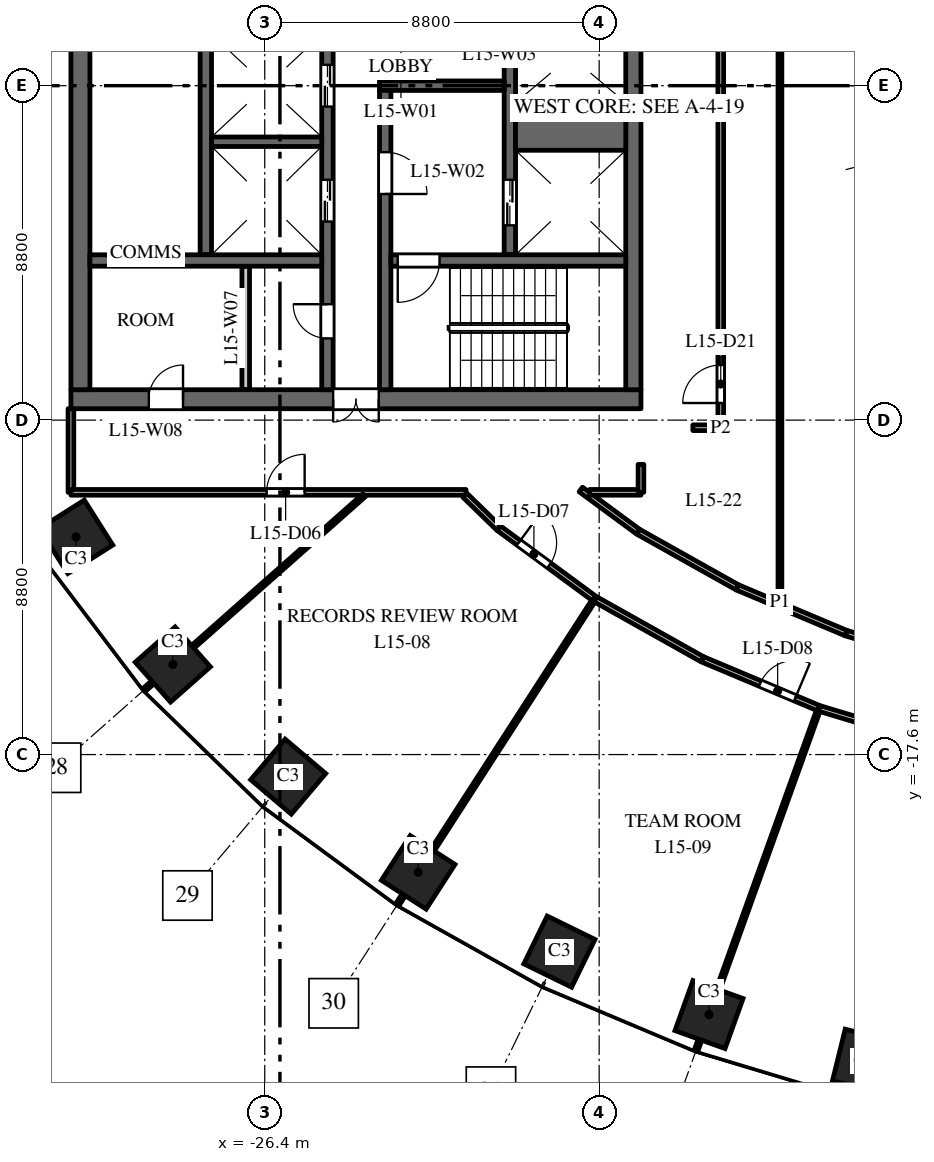
"""IFC4 building model, lengths in metres.
Left out: names, types, materials, properties, quantities, classifications, styles, units other than length and angle.
Written with IfcOpenShell. Run it as: python <this file> out.ifc"""

import sys

from ifc_helpers import new_model, si_unit, direction, frame, frame_2d, origin, origin_2d, place, context, subcontext, project, spatial, rectangle, extrude, element, fill, save


model = new_model("IFC4")
c1 = context("Model", 3, precision=1e-05, world=origin(), true_north=direction((0.0, 1.0)))
c2 = subcontext(c1, "Body", "Model", "MODEL_VIEW")
j1 = project(units=[si_unit("LENGTHUNIT", "METRE"), si_unit("PLANEANGLEUNIT", "RADIAN")], contexts=[c1])
p1 = place(None, origin())
s1 = spatial("IfcSite", under=j1, at=p1, CompositionType="ELEMENT")
p2 = place(p1, origin())
s2 = spatial("IfcBuilding", under=s1, at=p2, CompositionType="ELEMENT")
p3 = place(p2, frame((0.0, 0.0, 70.5)))
s3 = spatial("IfcBuildingStorey", under=s2, at=p3, CompositionType="ELEMENT", Elevation=70.5)
for number, where, z_axis, x_axis in (
    (1, (-31.365, -11.871, 0.0), (0.0, 0.0, 1.0), (0.535, -0.845, 0.0)),
    (2, (-28.819, -15.23, 0.0), (0.0, 0.0, 1.0), (0.663, -0.749, 0.0)),
    (3, (-25.783, -18.18, 0.0), (0.0, 0.0, 1.0), (0.763, -0.646, 0.0)),
    (4, (-22.362, -20.7, 0.0), (0.0, 0.0, 1.0), (0.84, -0.542, 0.0)),
    (5, (-18.646, -22.785, 0.0), (0.0, 0.0, 1.0), (0.898, -0.439, 0.0)),
    (6, (-14.709, -24.441, 0.0), (0.0, 0.0, 1.0), (0.941, -0.338, 0.0)),
    (7, (-10.613, -25.674, 0.0), (0.0, 0.0, 1.0), (0.971, -0.24, 0.0)),
):
    element("IfcColumn", number, at=place(p3, frame(where, z_axis=z_axis, x_axis=x_axis)), inside=s3, PredefinedType="COLUMN", context=c2, shape_type="SweptSolid", body=[
        extrude(rectangle(XDim=1.4, YDim=1.4, at=origin_2d()), origin(), (0.0, 0.0, 1.0), 4.0),
    ])
p4 = place(p3, frame((-16.5, -8.25, 0.0), z_axis=(0.0, 0.0, 1.0), x_axis=(-1.0, 0.0, 0.0)))
e8 = element("IfcWall", 8, at=p4, inside=s3, PredefinedType="SHEAR", context=c2, shape_type="SweptSolid", body=[
    extrude(rectangle(XDim=15.0, YDim=0.5, at=frame_2d((7.5, 0.0))), origin(), (0.0, 0.0, 1.0), 3.7),
])
p5 = place(p4, frame((6.9, 0.0, 0.0)))
e9 = element("IfcOpeningElement", 9, at=p5, cuts=e8, PredefinedType="OPENING", context=c2, shape_type="SweptSolid", body=[
    extrude(rectangle(XDim=1.2, YDim=2.1, at=frame_2d((0.6, 1.05))), frame((0.0, 0.26, 0.0), z_axis=(0.0, -1.0, 0.0), x_axis=(1.0, 0.0, 0.0)), (0.0, 0.0, 1.0), 0.52),
])
p6 = place(p4, frame((12.05, 0.0, 0.0)))
e10 = element("IfcOpeningElement", 10, at=p6, cuts=e8, PredefinedType="OPENING", context=c2, shape_type="SweptSolid", body=[
    extrude(rectangle(XDim=0.9, YDim=2.1, at=frame_2d((0.45, 1.05))), frame((0.0, 0.26, 0.0), z_axis=(0.0, -1.0, 0.0), x_axis=(1.0, 0.0, 0.0)), (0.0, 0.0, 1.0), 0.52),
])
p7 = place(p3, frame((-27.95, -4.45, 0.0), z_axis=(0.0, 0.0, 1.0), x_axis=(0.0, 1.0, 0.0)))
e11 = element("IfcWall", 11, at=p7, inside=s3, PredefinedType="SHEAR", context=c2, shape_type="SweptSolid", body=[
    extrude(rectangle(XDim=8.9, YDim=0.3, at=frame_2d((4.45, 0.0))), origin(), (0.0, 0.0, 1.0), 3.7),
])
p8 = place(p3, frame((-19.95, -4.45, 0.0), z_axis=(0.0, 0.0, 1.0), x_axis=(0.0, 1.0, 0.0)))
e12 = element("IfcWall", 12, at=p8, inside=s3, PredefinedType="SHEAR", context=c2, shape_type="SweptSolid", body=[
    extrude(rectangle(XDim=8.9, YDim=0.3, at=frame_2d((4.45, 0.0))), origin(), (0.0, 0.0, 1.0), 3.7),
])
p9 = place(p8, frame((0.775, 0.0, 0.0)))
e13 = element("IfcOpeningElement", 13, at=p9, cuts=e12, PredefinedType="OPENING", context=c2, shape_type="SweptSolid", body=[
    extrude(rectangle(XDim=1.2, YDim=2.1, at=frame_2d((0.6, 1.05))), frame((0.0, 0.16, 0.0), z_axis=(0.0, -1.0, 0.0), x_axis=(1.0, 0.0, 0.0)), (0.0, 0.0, 1.0), 0.32),
])
p10 = place(p8, frame((7.35, 0.0, 0.0)))
e14 = element("IfcOpeningElement", 14, at=p10, cuts=e12, PredefinedType="OPENING", context=c2, shape_type="SweptSolid", body=[
    extrude(rectangle(XDim=0.9, YDim=2.1, at=frame_2d((0.45, 1.05))), frame((0.0, 0.16, 0.0), z_axis=(0.0, -1.0, 0.0), x_axis=(1.0, 0.0, 0.0)), (0.0, 0.0, 1.0), 0.32),
])
p11 = place(p3, frame((-24.75, -8.0, 0.0), z_axis=(0.0, 0.0, 1.0), x_axis=(0.0, 1.0, 0.0)))
e15 = element("IfcWall", 15, at=p11, inside=s3, PredefinedType="SHEAR", context=c2, shape_type="SweptSolid", body=[
    extrude(rectangle(XDim=16.0, YDim=0.3, at=frame_2d((8.0, 0.0))), origin(), (0.0, 0.0, 1.0), 3.7),
])
p12 = place(p11, frame((4.425, 0.0, 0.0)))
e16 = element("IfcOpeningElement", 16, at=p12, cuts=e15, PredefinedType="OPENING", context=c2, shape_type="SweptSolid", body=[
    extrude(rectangle(XDim=1.1, YDim=2.1, at=frame_2d((0.55, 1.05))), frame((0.0, 0.16, 0.0), z_axis=(0.0, -1.0, 0.0), x_axis=(1.0, 0.0, 0.0)), (0.0, 0.0, 1.0), 0.32),
])
p13 = place(p11, frame((7.45, 0.0, 0.0)))
e17 = element("IfcOpeningElement", 17, at=p13, cuts=e15, PredefinedType="OPENING", context=c2, shape_type="SweptSolid", body=[
    extrude(rectangle(XDim=1.1, YDim=2.1, at=frame_2d((0.55, 1.05))), frame((0.0, 0.16, 0.0), z_axis=(0.0, -1.0, 0.0), x_axis=(1.0, 0.0, 0.0)), (0.0, 0.0, 1.0), 0.32),
])
p14 = place(p11, frame((10.425, 0.0, 0.0)))
e18 = element("IfcOpeningElement", 18, at=p14, cuts=e15, PredefinedType="OPENING", context=c2, shape_type="SweptSolid", body=[
    extrude(rectangle(XDim=1.2, YDim=2.1, at=frame_2d((0.6, 1.05))), frame((0.0, 0.16, 0.0), z_axis=(0.0, -1.0, 0.0), x_axis=(1.0, 0.0, 0.0)), (0.0, 0.0, 1.0), 0.32),
])
p15 = place(p11, frame((13.75, 0.0, 0.0)))
e19 = element("IfcOpeningElement", 19, at=p15, cuts=e15, PredefinedType="OPENING", context=c2, shape_type="SweptSolid", body=[
    extrude(rectangle(XDim=0.9, YDim=2.1, at=frame_2d((0.45, 1.05))), frame((0.0, 0.16, 0.0), z_axis=(0.0, -1.0, 0.0), x_axis=(1.0, 0.0, 0.0)), (0.0, 0.0, 1.0), 0.32),
])
p16 = place(p11, frame((1.35, 0.0, 0.0)))
e20 = element("IfcOpeningElement", 20, at=p16, cuts=e15, PredefinedType="OPENING", context=c2, shape_type="SweptSolid", body=[
    extrude(rectangle(XDim=0.9, YDim=2.1, at=frame_2d((0.45, 1.05))), frame((0.0, 0.16, 0.0), z_axis=(0.0, -1.0, 0.0), x_axis=(1.0, 0.0, 0.0)), (0.0, 0.0, 1.0), 0.32),
])
p17 = place(p3, frame((-20.1, 0.0, 0.0), z_axis=(0.0, 0.0, 1.0), x_axis=(-1.0, 0.0, 0.0)))
e21 = element("IfcWall", 21, at=p17, inside=s3, PredefinedType="SHEAR", context=c2, shape_type="SweptSolid", body=[
    extrude(rectangle(XDim=3.28, YDim=0.25, at=frame_2d((1.64, 0.0))), origin(), (0.0, 0.0, 1.0), 3.7),
])
p18 = place(p3, frame((-16.7, -8.0, 0.0), z_axis=(0.0, 0.0, 1.0), x_axis=(0.0, 1.0, 0.0)))
e22 = element("IfcWall", 22, at=p18, inside=s3, PredefinedType="SHEAR", context=c2, shape_type="SweptSolid", body=[
    extrude(rectangle(XDim=16.0, YDim=0.4, at=frame_2d((8.0, 0.0))), origin(), (0.0, 0.0, 1.0), 3.7),
])
p19 = place(p3, frame((-31.25, -8.0, 0.0), z_axis=(0.0, 0.0, 1.0), x_axis=(0.0, 1.0, 0.0)))
e23 = element("IfcWall", 23, at=p19, inside=s3, PredefinedType="SHEAR", context=c2, shape_type="SweptSolid", body=[
    extrude(rectangle(XDim=16.0, YDim=0.5, at=frame_2d((8.0, 0.0))), origin(), (0.0, 0.0, 1.0), 3.7),
])
p20 = place(p3, frame((-26.9, -8.0, 0.0), z_axis=(0.0, 0.0, 1.0), x_axis=(0.0, 1.0, 0.0)))
e24 = element("IfcWall", 24, at=p20, inside=s3, PredefinedType="PARTITIONING", context=c2, shape_type="SweptSolid", body=[
    extrude(rectangle(XDim=3.25, YDim=0.2, at=frame_2d((1.625, 0.0))), origin(), (0.0, 0.0, 1.0), 3.7),
])
p21 = place(p3, frame((-24.9, -4.6, 0.0), z_axis=(0.0, 0.0, 1.0), x_axis=(-1.0, 0.0, 0.0)))
e25 = element("IfcWall", 25, at=p21, inside=s3, PredefinedType="SHEAR", context=c2, shape_type="SweptSolid", body=[
    extrude(rectangle(XDim=6.1, YDim=0.3, at=frame_2d((3.05, 0.0))), origin(), (0.0, 0.0, 1.0), 3.7),
])
p22 = place(p3, frame((-16.9, -1.075, 0.0), z_axis=(0.0, 0.0, 1.0), x_axis=(-1.0, 0.0, 0.0)))
e26 = element("IfcWall", 26, at=p22, inside=s3, PredefinedType="SHEAR", context=c2, shape_type="SweptSolid", body=[
    extrude(rectangle(XDim=2.9, YDim=1.25, at=frame_2d((1.45, 0.0))), origin(), (0.0, 0.0, 1.0), 3.7),
])
p23 = place(p3, frame((-24.9, -1.475, 0.0), z_axis=(0.0, 0.0, 1.0), x_axis=(-1.0, 0.0, 0.0)))
e27 = element("IfcWall", 27, at=p23, inside=s3, PredefinedType="SHEAR", context=c2, shape_type="SweptSolid", body=[
    extrude(rectangle(XDim=2.9, YDim=0.25, at=frame_2d((1.45, 0.0))), origin(), (0.0, 0.0, 1.0), 3.7),
])
p24 = place(p3, frame((-23.23, -8.0, 0.0), z_axis=(0.0, 0.0, 1.0), x_axis=(0.0, 1.0, 0.0)))
e28 = element("IfcWall", 28, at=p24, inside=s3, PredefinedType="SHEAR", context=c2, shape_type="SweptSolid", body=[
    extrude(rectangle(XDim=7.875, YDim=0.3, at=frame_2d((3.938, 0.0))), origin(), (0.0, 0.0, 1.0), 3.7),
])
p25 = place(p24, frame((5.15, 0.0, 0.0)))
e29 = element("IfcOpeningElement", 29, at=p25, cuts=e28, PredefinedType="OPENING", context=c2, shape_type="SweptSolid", body=[
    extrude(rectangle(XDim=1.1, YDim=2.1, at=frame_2d((0.55, 1.05))), frame((0.0, 0.16, 0.0), z_axis=(0.0, -1.0, 0.0), x_axis=(1.0, 0.0, 0.0)), (0.0, 0.0, 1.0), 0.32),
])
p26 = place(p3, frame((-16.9, -4.6, 0.0), z_axis=(0.0, 0.0, 1.0), x_axis=(-1.0, 0.0, 0.0)))
e30 = element("IfcWall", 30, at=p26, inside=s3, PredefinedType="SHEAR", context=c2, shape_type="SweptSolid", body=[
    extrude(rectangle(XDim=6.18, YDim=0.3, at=frame_2d((3.09, 0.0))), origin(), (0.0, 0.0, 1.0), 3.7),
])
p27 = place(p26, frame((4.9, 0.0, 0.0)))
e31 = element("IfcOpeningElement", 31, at=p27, cuts=e30, PredefinedType="OPENING", context=c2, shape_type="SweptSolid", body=[
    extrude(rectangle(XDim=1.1, YDim=2.1, at=frame_2d((0.55, 1.05))), frame((0.0, 0.16, 0.0), z_axis=(0.0, -1.0, 0.0), x_axis=(1.0, 0.0, 0.0)), (0.0, 0.0, 1.0), 0.32),
])
p28 = place(p3, frame((-31.5, -10.7, 0.0), z_axis=(0.0, 0.0, 1.0), x_axis=(0.0, 1.0, 0.0)))
e32 = element("IfcWall", 32, at=p28, inside=s3, PredefinedType="PARTITIONING", context=c2, shape_type="SweptSolid", body=[
    extrude(rectangle(XDim=2.2, YDim=0.15, at=frame_2d((1.1, 0.0))), origin(), (0.0, 0.0, 1.0), 3.7),
])
p29 = place(p3, frame((-31.5, -10.7, 0.0), z_axis=(0.0, 0.0, 1.0), x_axis=(1.0, 0.0, 0.0)))
e33 = element("IfcWall", 33, at=p29, inside=s3, PredefinedType="PARTITIONING", context=c2, shape_type="SweptSolid", body=[
    extrude(rectangle(XDim=10.396, YDim=0.15, at=frame_2d((5.198, 0.0))), origin(), (0.0, 0.0, 1.0), 3.1),
])
p30 = place(p29, frame((5.15, 0.0, 0.0)))
e34 = element("IfcOpeningElement", 34, at=p30, cuts=e33, PredefinedType="OPENING", context=c2, shape_type="SweptSolid", body=[
    extrude(rectangle(XDim=1.0, YDim=2.1, at=frame_2d((0.5, 1.05))), frame((0.0, 0.085, 0.0), z_axis=(0.0, -1.0, 0.0), x_axis=(1.0, 0.0, 0.0)), (0.0, 0.0, 1.0), 0.17),
])
p31 = place(p3, frame((-29.569, -15.895, 0.0), z_axis=(0.0, 0.0, 1.0), x_axis=(0.748985701008, 0.662586160198, 0.0)))
e35 = element("IfcWall", 35, at=p31, inside=s3, PredefinedType="PARTITIONING", context=c2, shape_type="SweptSolid", body=[
    extrude(rectangle(XDim=7.723, YDim=0.1, at=frame_2d((3.861, 0.0))), origin(), (0.0, 0.0, 1.0), 2.85),
])
p32 = place(p3, frame((-22.905, -21.542, 0.0), z_axis=(0.0, 0.0, 1.0), x_axis=(0.542244314938, 0.840220865557, 0.0)))
e36 = element("IfcWall", 36, at=p32, inside=s3, PredefinedType="PARTITIONING", context=c2, shape_type="SweptSolid", body=[
    extrude(rectangle(XDim=9.564, YDim=0.1, at=frame_2d((4.782, 0.0))), origin(), (0.0, 0.0, 1.0), 2.85),
])
p33 = place(p3, frame((-21.135, -10.775, 0.0), z_axis=(0.0, 0.0, 1.0), x_axis=(0.717043956417, -0.697027951065, 0.0)))
e37 = element("IfcWall", 37, at=p33, inside=s3, PredefinedType="PARTITIONING", context=c2, shape_type="SweptSolid", body=[
    extrude(rectangle(XDim=1.244, YDim=0.15, at=frame_2d((0.622, 0.0))), origin(), (0.0, 0.0, 1.0), 3.7),
])
p34 = place(p3, frame((-20.243, -11.642, 0.0), z_axis=(0.0, 0.0, 1.0), x_axis=(0.805148342369, -0.593073475027, 0.0)))
e38 = element("IfcWall", 38, at=p34, inside=s3, PredefinedType="PARTITIONING", context=c2, shape_type="SweptSolid", body=[
    extrude(rectangle(XDim=3.117, YDim=0.15, at=frame_2d((1.559, 0.0))), origin(), (0.0, 0.0, 1.0), 2.75),
])
p35 = place(p34, frame((0.65, 0.0, 0.0)))
e39 = element("IfcOpeningElement", 39, at=p35, cuts=e38, PredefinedType="OPENING", context=c2, shape_type="SweptSolid", body=[
    extrude(rectangle(XDim=1.0, YDim=2.1, at=frame_2d((0.5, 1.05))), frame((0.0, 0.085, 0.0), z_axis=(0.0, -1.0, 0.0), x_axis=(1.0, 0.0, 0.0)), (0.0, 0.0, 1.0), 0.17),
])
p36 = place(p3, frame((-18.083, -10.625, 0.0), z_axis=(0.0, 0.0, 1.0), x_axis=(0.805150898842, -0.593070004379, 0.0)))
e40 = element("IfcWall", 40, at=p36, inside=s3, PredefinedType="PARTITIONING", context=c2, shape_type="SweptSolid", body=[
    extrude(rectangle(XDim=1.872, YDim=0.15, at=frame_2d((0.936, 0.0))), origin(), (0.0, 0.0, 1.0), 2.75),
])
p37 = place(p3, frame((-17.855, -10.7, 0.0), z_axis=(0.0, 0.0, 1.0), x_axis=(1.0, 0.0, 0.0)))
e41 = element("IfcWall", 41, at=p37, inside=s3, PredefinedType="PARTITIONING", context=c2, shape_type="SweptSolid", body=[
    extrude(rectangle(XDim=1.355, YDim=0.15, at=frame_2d((0.677, 0.0))), origin(), (0.0, 0.0, 1.0), 3.7),
])
p38 = place(p3, frame((-17.699, -13.513, 0.0), z_axis=(0.0, 0.0, 1.0), x_axis=(0.872072163686, -0.489377299559, 0.0)))
e42 = element("IfcWall", 42, at=p38, inside=s3, PredefinedType="PARTITIONING", context=c2, shape_type="SweptSolid", body=[
    extrude(rectangle(XDim=3.227, YDim=0.15, at=frame_2d((1.613, 0.0))), origin(), (0.0, 0.0, 1.0), 3.7),
])
p39 = place(p3, frame((-16.576, -11.735, 0.0), z_axis=(0.0, 0.0, 1.0), x_axis=(0.872164226045, -0.489213207924, 0.0)))
e43 = element("IfcWall", 43, at=p39, inside=s3, PredefinedType="PARTITIONING", context=c2, shape_type="SweptSolid", body=[
    extrude(rectangle(XDim=2.998, YDim=0.15, at=frame_2d((1.499, 0.0))), origin(), (0.0, 0.0, 1.0), 2.75),
])
p40 = place(p3, frame((-16.5, -10.7, 0.0), z_axis=(0.0, 0.0, 1.0), x_axis=(0.0, 1.0, 0.0)))
e44 = element("IfcWall", 44, at=p40, inside=s3, PredefinedType="PARTITIONING", context=c2, shape_type="SweptSolid", body=[
    extrude(rectangle(XDim=0.736, YDim=0.15, at=frame_2d((0.368, 0.0))), origin(), (0.0, 0.0, 1.0), 3.7),
])
p41 = place(p3, frame((-15.134, -9.0, 0.0), z_axis=(0.0, 0.0, 1.0), x_axis=(1.0, 0.0, 0.0)))
e45 = element("IfcWall", 45, at=p41, inside=s3, PredefinedType="PARTITIONING", context=c2, shape_type="SweptSolid", body=[
    extrude(rectangle(XDim=0.734, YDim=0.15, at=frame_2d((0.367, 0.0))), origin(), (0.0, 0.0, 1.0), 3.7),
])
p42 = place(p3, frame((-15.048, -25.383, 0.0), z_axis=(0.0, 0.0, 1.0), x_axis=(0.338338680362, 0.941024408488, 0.0)))
e46 = element("IfcWall", 46, at=p42, inside=s3, PredefinedType="PARTITIONING", context=c2, shape_type="SweptSolid", body=[
    extrude(rectangle(XDim=9.559, YDim=0.1, at=frame_2d((4.779, 0.0))), origin(), (0.0, 0.0, 1.0), 2.85),
])
p43 = place(p3, frame((-14.885, -15.092, 0.0), z_axis=(0.0, 0.0, 1.0), x_axis=(0.921844706698, -0.387559462189, 0.0)))
e47 = element("IfcWall", 47, at=p43, inside=s3, PredefinedType="PARTITIONING", context=c2, shape_type="SweptSolid", body=[
    extrude(rectangle(XDim=3.313, YDim=0.15, at=frame_2d((1.656, 0.0))), origin(), (0.0, 0.0, 1.0), 2.85),
])
p44 = place(p43, frame((1.65, 0.0, 0.0)))
e48 = element("IfcOpeningElement", 48, at=p44, cuts=e47, PredefinedType="OPENING", context=c2, shape_type="SweptSolid", body=[
    extrude(rectangle(XDim=1.0, YDim=2.1, at=frame_2d((0.5, 1.05))), frame((0.0, 0.085, 0.0), z_axis=(0.0, -1.0, 0.0), x_axis=(1.0, 0.0, 0.0)), (0.0, 0.0, 1.0), 0.17),
])
p45 = place(p3, frame((-14.4, -9.0, 0.0), z_axis=(0.0, 0.0, 1.0), x_axis=(0.0, 1.0, 0.0)))
e49 = element("IfcWall", 49, at=p45, inside=s3, PredefinedType="PARTITIONING", context=c2, shape_type="SweptSolid", body=[
    extrude(rectangle(XDim=18.0, YDim=0.15, at=frame_2d((9.0, 0.0))), origin(), (0.0, 0.0, 1.0), 3.7),
])
p46 = place(p45, frame((0.65, 0.0, 0.0)))
e50 = element("IfcOpeningElement", 50, at=p46, cuts=e49, PredefinedType="OPENING", context=c2, shape_type="SweptSolid", body=[
    extrude(rectangle(XDim=1.0, YDim=2.1, at=frame_2d((0.5, 1.05))), frame((0.0, 0.085, 0.0), z_axis=(0.0, -1.0, 0.0), x_axis=(1.0, 0.0, 0.0)), (0.0, 0.0, 1.0), 0.17),
])
p47 = place(p3, frame((-13.961, -13.202, 0.0), z_axis=(0.0, 0.0, 1.0), x_axis=(0.921753827375, -0.387775555857, 0.0)))
e51 = element("IfcWall", 51, at=p47, inside=s3, PredefinedType="PARTITIONING", context=c2, shape_type="SweptSolid", body=[
    extrude(rectangle(XDim=3.103, YDim=0.15, at=frame_2d((1.551, 0.0))), origin(), (0.0, 0.0, 1.0), 2.85),
])
p48 = place(p3, frame((-12.843, -13.587, 0.0), z_axis=(0.0, 0.0, 1.0), x_axis=(0.0, 1.0, 0.0)))
e52 = element("IfcWall", 52, at=p48, inside=s3, PredefinedType="PARTITIONING", context=c2, shape_type="SweptSolid", body=[
    extrude(rectangle(XDim=27.174, YDim=0.1, at=frame_2d((13.587, 0.0))), origin(), (0.0, 0.0, 1.0), 2.75),
])
p49 = place(p3, frame((-11.812, -16.384, 0.0), z_axis=(0.0, 0.0, 1.0), x_axis=(0.95754884035, -0.28827108482, 0.0)))
e53 = element("IfcWall", 53, at=p49, inside=s3, PredefinedType="PARTITIONING", context=c2, shape_type="SweptSolid", body=[
    extrude(rectangle(XDim=3.396, YDim=0.15, at=frame_2d((1.698, 0.0))), origin(), (0.0, 0.0, 1.0), 3.7),
])
p50 = place(p3, frame((-11.101, -14.405, 0.0), z_axis=(0.0, 0.0, 1.0), x_axis=(0.957612601062, -0.28805920622, 0.0)))
e54 = element("IfcWall", 54, at=p50, inside=s3, PredefinedType="PARTITIONING", context=c2, shape_type="SweptSolid", body=[
    extrude(rectangle(XDim=3.18, YDim=0.15, at=frame_2d((1.59, 0.0))), origin(), (0.0, 0.0, 1.0), 3.7),
])
p51 = place(p9, origin())
e55 = element("IfcDoor", 55, at=p51, inside=s3, OperationType="DOUBLE_DOOR_SLIDING", PredefinedType="DOOR", context=c2, shape_type="SweptSolid", body=[
    extrude(rectangle(XDim=1.2, YDim=2.1, at=frame_2d((0.6, 1.05))), frame((0.0, 0.025, 0.0), z_axis=(0.0, -1.0, 0.0), x_axis=(1.0, 0.0, 0.0)), (0.0, 0.0, 1.0), 0.05),
])
fill(e13, e55)
p52 = place(p12, origin())
e56 = element("IfcDoor", 56, at=p52, inside=s3, OperationType="DOUBLE_DOOR_SLIDING", PredefinedType="DOOR", context=c2, shape_type="SweptSolid", body=[
    extrude(rectangle(XDim=1.1, YDim=2.1, at=frame_2d((0.55, 1.05))), frame((0.0, 0.025, 0.0), z_axis=(0.0, -1.0, 0.0), x_axis=(1.0, 0.0, 0.0)), (0.0, 0.0, 1.0), 0.05),
])
fill(e16, e56)
p53 = place(p13, origin())
e57 = element("IfcDoor", 57, at=p53, inside=s3, OperationType="DOUBLE_DOOR_SLIDING", PredefinedType="DOOR", context=c2, shape_type="SweptSolid", body=[
    extrude(rectangle(XDim=1.1, YDim=2.1, at=frame_2d((0.55, 1.05))), frame((0.0, 0.025, 0.0), z_axis=(0.0, -1.0, 0.0), x_axis=(1.0, 0.0, 0.0)), (0.0, 0.0, 1.0), 0.05),
])
fill(e17, e57)
p54 = place(p27, origin())
e58 = element("IfcDoor", 58, at=p54, inside=s3, OperationType="SINGLE_SWING_LEFT", PredefinedType="DOOR", context=c2, shape_type="SweptSolid", body=[
    extrude(rectangle(XDim=1.1, YDim=2.1, at=frame_2d((0.55, 1.05))), frame((0.0, 0.025, 0.0), z_axis=(0.0, -1.0, 0.0), x_axis=(1.0, 0.0, 0.0)), (0.0, 0.0, 1.0), 0.05),
])
fill(e31, e58)
p55 = place(p25, origin())
e59 = element("IfcDoor", 59, at=p55, inside=s3, OperationType="SINGLE_SWING_LEFT", PredefinedType="DOOR", context=c2, shape_type="SweptSolid", body=[
    extrude(rectangle(XDim=1.1, YDim=2.1, at=frame_2d((0.55, 1.05))), frame((0.0, 0.025, 0.0), z_axis=(0.0, -1.0, 0.0), x_axis=(1.0, 0.0, 0.0)), (0.0, 0.0, 1.0), 0.05),
])
fill(e29, e59)
p56 = place(p5, origin())
e60 = element("IfcDoor", 60, at=p56, inside=s3, OperationType="DOUBLE_DOOR_DOUBLE_SWING", PredefinedType="DOOR", context=c2, shape_type="SweptSolid", body=[
    extrude(rectangle(XDim=1.2, YDim=2.1, at=frame_2d((0.6, 1.05))), frame((0.0, 0.025, 0.0), z_axis=(0.0, -1.0, 0.0), x_axis=(1.0, 0.0, 0.0)), (0.0, 0.0, 1.0), 0.05),
])
fill(e9, e60)
p57 = place(p16, origin())
e61 = element("IfcDoor", 61, at=p57, inside=s3, OperationType="SINGLE_SWING_LEFT", PredefinedType="DOOR", context=c2, shape_type="SweptSolid", body=[
    extrude(rectangle(XDim=0.9, YDim=2.1, at=frame_2d((0.45, 1.05))), frame((0.0, 0.025, 0.0), z_axis=(0.0, -1.0, 0.0), x_axis=(1.0, 0.0, 0.0)), (0.0, 0.0, 1.0), 0.05),
])
fill(e20, e61)
p58 = place(p6, origin())
e62 = element("IfcDoor", 62, at=p58, inside=s3, OperationType="SINGLE_SWING_LEFT", PredefinedType="DOOR", context=c2, shape_type="SweptSolid", body=[
    extrude(rectangle(XDim=0.9, YDim=2.1, at=frame_2d((0.45, 1.05))), frame((0.0, 0.025, 0.0), z_axis=(0.0, -1.0, 0.0), x_axis=(1.0, 0.0, 0.0)), (0.0, 0.0, 1.0), 0.05),
])
fill(e10, e62)
p59 = place(p30, origin())
e63 = element("IfcDoor", 63, at=p59, inside=s3, OperationType="SINGLE_SWING_RIGHT", PredefinedType="DOOR", context=c2, shape_type="SweptSolid", body=[
    extrude(rectangle(XDim=1.0, YDim=2.1, at=frame_2d((0.5, 1.05))), frame((0.0, 0.025, 0.0), z_axis=(0.0, -1.0, 0.0), x_axis=(1.0, 0.0, 0.0)), (0.0, 0.0, 1.0), 0.05),
])
fill(e34, e63)
p60 = place(p35, origin())
e64 = element("IfcDoor", 64, at=p60, inside=s3, OperationType="SINGLE_SWING_LEFT", PredefinedType="DOOR", context=c2, shape_type="SweptSolid", body=[
    extrude(rectangle(XDim=1.0, YDim=2.1, at=frame_2d((0.5, 1.05))), frame((0.0, 0.025, 0.0), z_axis=(0.0, -1.0, 0.0), x_axis=(1.0, 0.0, 0.0)), (0.0, 0.0, 1.0), 0.05),
])
fill(e39, e64)
p61 = place(p44, origin())
e65 = element("IfcDoor", 65, at=p61, inside=s3, OperationType="SINGLE_SWING_RIGHT", PredefinedType="DOOR", context=c2, shape_type="SweptSolid", body=[
    extrude(rectangle(XDim=1.0, YDim=2.1, at=frame_2d((0.5, 1.05))), frame((0.0, 0.025, 0.0), z_axis=(0.0, -1.0, 0.0), x_axis=(1.0, 0.0, 0.0)), (0.0, 0.0, 1.0), 0.05),
])
fill(e48, e65)
p62 = place(p46, origin())
e66 = element("IfcDoor", 66, at=p62, inside=s3, OperationType="SINGLE_SWING_LEFT", PredefinedType="DOOR", context=c2, shape_type="SweptSolid", body=[
    extrude(rectangle(XDim=1.0, YDim=2.1, at=frame_2d((0.5, 1.05))), frame((0.0, 0.025, 0.0), z_axis=(0.0, -1.0, 0.0), x_axis=(1.0, 0.0, 0.0)), (0.0, 0.0, 1.0), 0.05),
])
fill(e50, e66)
save(model, sys.argv[1])
